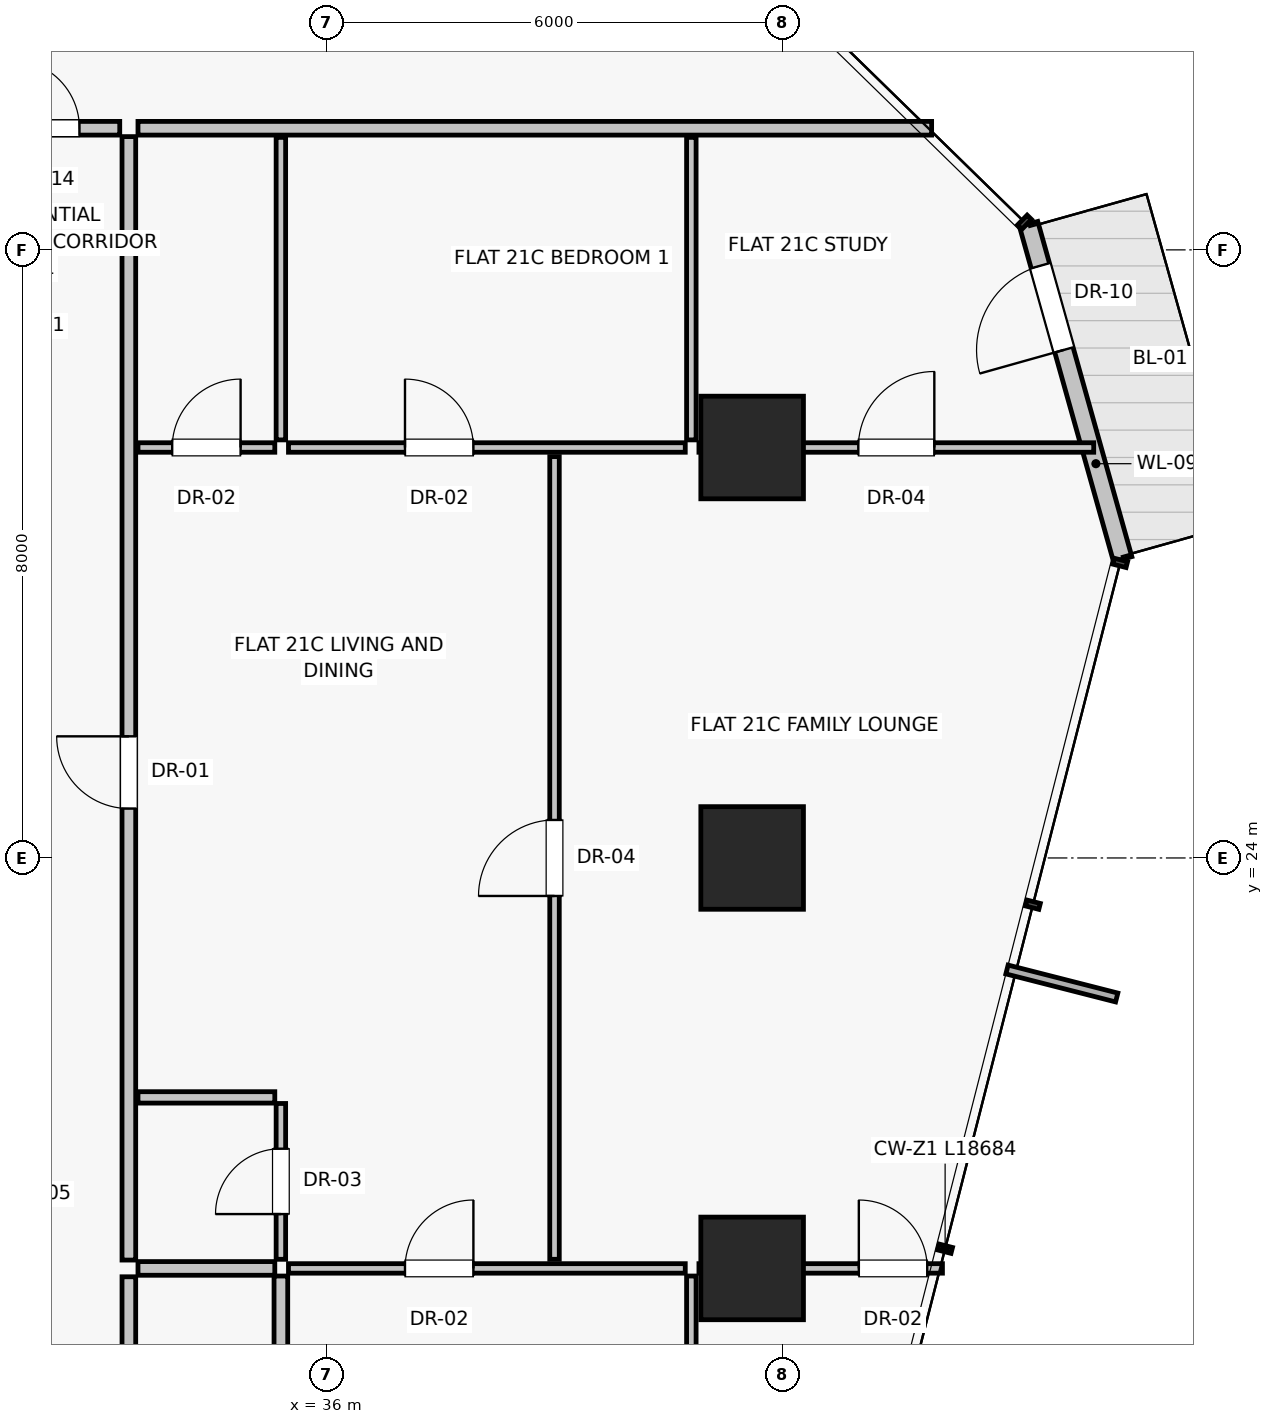
"""IFC4 building model, lengths in metres.
Left out: names, types, materials, properties, quantities, classifications, styles, units other than length and angle.
Written with IfcOpenShell. Run it as: python <this file> out.ifc"""

import sys

from ifc_helpers import new_model, si_unit, direction, frame, frame_2d, origin, origin_2d, place, context, subcontext, project, spatial, rectangle, extrude, source, transform, mapped, element, fill, save


model = new_model("IFC4")
c1 = context("Model", 3, precision=1e-05, world=origin(), true_north=direction((0.0, 1.0)))
c2 = subcontext(c1, "Body", "Model", "MODEL_VIEW")
j1 = project(units=[si_unit("LENGTHUNIT", "METRE"), si_unit("PLANEANGLEUNIT", "RADIAN")], contexts=[c1])
p1 = place(None, origin())
s1 = spatial("IfcSite", under=j1, at=p1, CompositionType="ELEMENT")
p2 = place(p1, origin())
s2 = spatial("IfcBuilding", under=s1, at=p2, CompositionType="ELEMENT")
p3 = place(p2, frame((0.0, 0.0, 77.1)))
s3 = spatial("IfcBuildingStorey", under=s2, at=p3, CompositionType="ELEMENT", Elevation=77.1)
for number, where, z_axis, x_axis in (
    (1, (41.6, 18.6, 0.0), (0.0, 0.0, 1.0), (1.0, 0.0, 0.0)),
    (2, (41.6, 24.0, 0.0), (0.0, 0.0, 1.0), (1.0, 0.0, 0.0)),
    (3, (41.6, 29.4, 0.0), (0.0, 0.0, 1.0), (1.0, 0.0, 0.0)),
):
    element("IfcColumn", number, at=place(p3, frame(where, z_axis=z_axis, x_axis=x_axis)), inside=s3, PredefinedType="COLUMN", context=c2, shape_type="SweptSolid", body=[
        extrude(rectangle(XDim=1.35, YDim=1.35, at=origin_2d()), origin(), (0.0, 0.0, 1.0), 3.25),
    ])
p4 = place(p3, frame((46.475, 27.93, 0.0), z_axis=(0.0, 0.0, 1.0), x_axis=(-0.270254656395, 0.962788876492, 0.0)))
e4 = element("IfcWall", 4, at=p4, inside=s3, PredefinedType="SOLIDWALL", context=c2, shape_type="SweptSolid", body=[
    extrude(rectangle(XDim=4.58, YDim=0.25, at=frame_2d((2.29, 0.0))), origin(), (0.0, 0.0, 1.0), 2.93),
])
p5 = place(p4, frame((2.86, 0.0, 0.0)))
e5 = element("IfcOpeningElement", 5, at=p5, cuts=e4, PredefinedType="OPENING", context=c2, shape_type="SweptSolid", body=[
    extrude(rectangle(XDim=1.15, YDim=2.25, at=frame_2d((0.575, 1.125))), frame((0.0, 0.135, 0.0), z_axis=(0.0, -1.0, 0.0), x_axis=(1.0, 0.0, 0.0)), (0.0, 0.0, 1.0), 0.27),
])
p6 = place(p3, frame((33.52, 33.6, 0.0), z_axis=(0.0, 0.0, 1.0), x_axis=(1.0, 0.0, 0.0)))
e6 = element("IfcWall", 6, at=p6, inside=s3, PredefinedType="PARTITIONING", context=c2, shape_type="SweptSolid", body=[
    extrude(rectangle(XDim=10.441, YDim=0.18, at=frame_2d((5.221, 0.0))), origin(), (0.0, 0.0, 1.0), 2.93),
])
p7 = place(p3, frame((33.4, 14.31, 0.0), z_axis=(0.0, 0.0, 1.0), x_axis=(0.0, 1.0, 0.0)))
e7 = element("IfcWall", 7, at=p7, inside=s3, PredefinedType="PARTITIONING", context=c2, shape_type="SweptSolid", body=[
    extrude(rectangle(XDim=4.18, YDim=0.18, at=frame_2d((2.09, 0.0))), origin(), (0.0, 0.0, 1.0), 2.93),
])
p8 = place(p7, frame((1.59, 0.0, 0.0)))
e8 = element("IfcOpeningElement", 8, at=p8, cuts=e7, PredefinedType="OPENING", context=c2, shape_type="SweptSolid", body=[
    extrude(rectangle(XDim=1.0, YDim=2.01, at=frame_2d((0.5, 1.005))), frame((0.0, 0.1, 0.0), z_axis=(0.0, -1.0, 0.0), x_axis=(1.0, 0.0, 0.0)), (0.0, 0.0, 1.0), 0.2),
])
p9 = place(p3, frame((33.4, 18.71, 0.0), z_axis=(0.0, 0.0, 1.0), x_axis=(0.0, 1.0, 0.0)))
e9 = element("IfcWall", 9, at=p9, inside=s3, PredefinedType="PARTITIONING", context=c2, shape_type="SweptSolid", body=[
    extrude(rectangle(XDim=14.78, YDim=0.18, at=frame_2d((7.39, 0.0))), origin(), (0.0, 0.0, 1.0), 2.93),
])
p10 = place(p9, frame((5.94, 0.0, 0.0)))
e10 = element("IfcOpeningElement", 10, at=p10, cuts=e9, PredefinedType="OPENING", context=c2, shape_type="SweptSolid", body=[
    extrude(rectangle(XDim=0.95, YDim=2.02, at=frame_2d((0.475, 1.01))), frame((0.0, 0.1, 0.0), z_axis=(0.0, -1.0, 0.0), x_axis=(1.0, 0.0, 0.0)), (0.0, 0.0, 1.0), 0.2),
])
p11 = place(p3, frame((40.8, 14.32, 0.0), z_axis=(0.0, 0.0, 1.0), x_axis=(0.0, 1.0, 0.0)))
e11 = element("IfcWall", 11, at=p11, inside=s3, PredefinedType="PARTITIONING", context=c2, shape_type="SweptSolid", body=[
    extrude(rectangle(XDim=4.18, YDim=0.125, at=frame_2d((2.09, 0.0))), origin(), (0.0, 0.0, 1.0), 2.93),
])
p12 = place(p3, frame((40.9, 18.6, 0.0), z_axis=(0.0, 0.0, 1.0), x_axis=(1.0, 0.0, 0.0)))
e12 = element("IfcWall", 12, at=p12, inside=s3, PredefinedType="PARTITIONING", context=c2, shape_type="SweptSolid", body=[
    extrude(rectangle(XDim=3.204, YDim=0.125, at=frame_2d((1.602, 0.0))), origin(), (0.0, 0.0, 1.0), 2.229),
])
p13 = place(p12, frame((2.104, 0.0, 0.0)))
e13 = element("IfcOpeningElement", 13, at=p13, cuts=e12, PredefinedType="OPENING", context=c2, shape_type="SweptSolid", body=[
    extrude(rectangle(XDim=0.9, YDim=2.01, at=frame_2d((0.45, 1.005))), frame((0.0, 0.073, 0.0), z_axis=(0.0, -1.0, 0.0), x_axis=(1.0, 0.0, 0.0)), (0.0, 0.0, 1.0), 0.145),
])
p14 = place(p3, frame((40.8, 29.5, 0.0), z_axis=(0.0, 0.0, 1.0), x_axis=(0.0, 1.0, 0.0)))
e14 = element("IfcWall", 14, at=p14, inside=s3, PredefinedType="PARTITIONING", context=c2, shape_type="SweptSolid", body=[
    extrude(rectangle(XDim=3.98, YDim=0.125, at=frame_2d((1.99, 0.0))), origin(), (0.0, 0.0, 1.0), 2.93),
])
p15 = place(p3, frame((40.9, 29.4, 0.0), z_axis=(0.0, 0.0, 1.0), x_axis=(1.0, 0.0, 0.0)))
e15 = element("IfcWall", 15, at=p15, inside=s3, PredefinedType="PARTITIONING", context=c2, shape_type="SweptSolid", body=[
    extrude(rectangle(XDim=5.194, YDim=0.125, at=frame_2d((2.597, 0.0))), origin(), (0.0, 0.0, 1.0), 2.229),
])
p16 = place(p15, frame((2.097, 0.0, 0.0)))
e16 = element("IfcOpeningElement", 16, at=p16, cuts=e15, PredefinedType="OPENING", context=c2, shape_type="SweptSolid", body=[
    extrude(rectangle(XDim=1.0, YDim=2.01, at=frame_2d((0.5, 1.005))), frame((0.0, 0.073, 0.0), z_axis=(0.0, -1.0, 0.0), x_axis=(1.0, 0.0, 0.0)), (0.0, 0.0, 1.0), 0.145),
])
p17 = place(p3, frame((39.0, 18.72, 0.0), z_axis=(0.0, 0.0, 1.0), x_axis=(0.0, 1.0, 0.0)))
e17 = element("IfcWall", 17, at=p17, inside=s3, PredefinedType="PARTITIONING", context=c2, shape_type="SweptSolid", body=[
    extrude(rectangle(XDim=10.56, YDim=0.125, at=frame_2d((5.28, 0.0))), origin(), (0.0, 0.0, 1.0), 2.93),
])
p18 = place(p17, frame((4.78, 0.0, 0.0)))
e18 = element("IfcOpeningElement", 18, at=p18, cuts=e17, PredefinedType="OPENING", context=c2, shape_type="SweptSolid", body=[
    extrude(rectangle(XDim=1.0, YDim=2.01, at=frame_2d((0.5, 1.005))), frame((0.0, 0.073, 0.0), z_axis=(0.0, -1.0, 0.0), x_axis=(1.0, 0.0, 0.0)), (0.0, 0.0, 1.0), 0.145),
])
p19 = place(p3, frame((35.4, 14.32, 0.0), z_axis=(0.0, 0.0, 1.0), x_axis=(0.0, 1.0, 0.0)))
e19 = element("IfcWall", 19, at=p19, inside=s3, PredefinedType="PARTITIONING", context=c2, shape_type="SweptSolid", body=[
    extrude(rectangle(XDim=4.18, YDim=0.18, at=frame_2d((2.09, 0.0))), origin(), (0.0, 0.0, 1.0), 2.93),
])
p20 = place(p3, frame((33.52, 18.6, 0.0), z_axis=(0.0, 0.0, 1.0), x_axis=(1.0, 0.0, 0.0)))
e20 = element("IfcWall", 20, at=p20, inside=s3, PredefinedType="PARTITIONING", context=c2, shape_type="SweptSolid", body=[
    extrude(rectangle(XDim=1.8, YDim=0.18, at=frame_2d((0.9, 0.0))), origin(), (0.0, 0.0, 1.0), 2.93),
])
p21 = place(p3, frame((35.5, 18.6, 0.0), z_axis=(0.0, 0.0, 1.0), x_axis=(1.0, 0.0, 0.0)))
e21 = element("IfcWall", 21, at=p21, inside=s3, PredefinedType="PARTITIONING", context=c2, shape_type="SweptSolid", body=[
    extrude(rectangle(XDim=5.22, YDim=0.125, at=frame_2d((2.61, 0.0))), origin(), (0.0, 0.0, 1.0), 2.229),
])
p22 = place(p21, frame((1.533, 0.0, 0.0)))
e22 = element("IfcOpeningElement", 22, at=p22, cuts=e21, PredefinedType="OPENING", context=c2, shape_type="SweptSolid", body=[
    extrude(rectangle(XDim=0.9, YDim=2.01, at=frame_2d((0.45, 1.005))), frame((0.0, 0.073, 0.0), z_axis=(0.0, -1.0, 0.0), x_axis=(1.0, 0.0, 0.0)), (0.0, 0.0, 1.0), 0.145),
])
p23 = place(p3, frame((33.52, 20.85, 0.0), z_axis=(0.0, 0.0, 1.0), x_axis=(1.0, 0.0, 0.0)))
e23 = element("IfcWall", 23, at=p23, inside=s3, PredefinedType="PARTITIONING", context=c2, shape_type="SweptSolid", body=[
    extrude(rectangle(XDim=1.8, YDim=0.15, at=frame_2d((0.9, 0.0))), origin(), (0.0, 0.0, 1.0), 2.93),
])
p24 = place(p3, frame((35.4, 18.72, 0.0), z_axis=(0.0, 0.0, 1.0), x_axis=(0.0, 1.0, 0.0)))
e24 = element("IfcWall", 24, at=p24, inside=s3, PredefinedType="PARTITIONING", context=c2, shape_type="SweptSolid", body=[
    extrude(rectangle(XDim=2.05, YDim=0.125, at=frame_2d((1.025, 0.0))), origin(), (0.0, 0.0, 1.0), 2.93),
])
p25 = place(p24, frame((0.595, 0.0, 0.0)))
e25 = element("IfcOpeningElement", 25, at=p25, cuts=e24, PredefinedType="OPENING", context=c2, shape_type="SweptSolid", body=[
    extrude(rectangle(XDim=0.86, YDim=2.01, at=frame_2d((0.43, 1.005))), frame((0.0, 0.073, 0.0), z_axis=(0.0, -1.0, 0.0), x_axis=(1.0, 0.0, 0.0)), (0.0, 0.0, 1.0), 0.145),
])
p26 = place(p3, frame((33.52, 29.4, 0.0), z_axis=(0.0, 0.0, 1.0), x_axis=(1.0, 0.0, 0.0)))
e26 = element("IfcWall", 26, at=p26, inside=s3, PredefinedType="PARTITIONING", context=c2, shape_type="SweptSolid", body=[
    extrude(rectangle(XDim=1.8, YDim=0.125, at=frame_2d((0.9, 0.0))), origin(), (0.0, 0.0, 1.0), 2.93),
])
p27 = place(p26, frame((0.45, 0.0, 0.0)))
e27 = element("IfcOpeningElement", 27, at=p27, cuts=e26, PredefinedType="OPENING", context=c2, shape_type="SweptSolid", body=[
    extrude(rectangle(XDim=0.9, YDim=2.01, at=frame_2d((0.45, 1.005))), frame((0.0, 0.073, 0.0), z_axis=(0.0, -1.0, 0.0), x_axis=(1.0, 0.0, 0.0)), (0.0, 0.0, 1.0), 0.145),
])
p28 = place(p3, frame((35.4, 29.5, 0.0), z_axis=(0.0, 0.0, 1.0), x_axis=(0.0, 1.0, 0.0)))
e28 = element("IfcWall", 28, at=p28, inside=s3, PredefinedType="PARTITIONING", context=c2, shape_type="SweptSolid", body=[
    extrude(rectangle(XDim=3.98, YDim=0.125, at=frame_2d((1.99, 0.0))), origin(), (0.0, 0.0, 1.0), 2.93),
])
p29 = place(p3, frame((35.5, 29.4, 0.0), z_axis=(0.0, 0.0, 1.0), x_axis=(1.0, 0.0, 0.0)))
e29 = element("IfcWall", 29, at=p29, inside=s3, PredefinedType="PARTITIONING", context=c2, shape_type="SweptSolid", body=[
    extrude(rectangle(XDim=5.22, YDim=0.125, at=frame_2d((2.61, 0.0))), origin(), (0.0, 0.0, 1.0), 2.229),
])
p30 = place(p29, frame((1.533, 0.0, 0.0)))
e30 = element("IfcOpeningElement", 30, at=p30, cuts=e29, PredefinedType="OPENING", context=c2, shape_type="SweptSolid", body=[
    extrude(rectangle(XDim=0.9, YDim=2.01, at=frame_2d((0.45, 1.005))), frame((0.0, 0.073, 0.0), z_axis=(0.0, -1.0, 0.0), x_axis=(1.0, 0.0, 0.0)), (0.0, 0.0, 1.0), 0.145),
])
p31 = place(p3, frame((31.32, 33.6, 0.0), z_axis=(0.0, 0.0, 1.0), x_axis=(1.0, 0.0, 0.0)))
e31 = element("IfcWall", 31, at=p31, inside=s3, PredefinedType="PARTITIONING", context=c2, shape_type="SweptSolid", body=[
    extrude(rectangle(XDim=1.96, YDim=0.18, at=frame_2d((0.98, 0.0))), origin(), (0.0, 0.0, 1.0), 2.93),
])
p32 = place(p31, frame((0.53, 0.0, 0.0)))
e32 = element("IfcOpeningElement", 32, at=p32, cuts=e31, PredefinedType="OPENING", context=c2, shape_type="SweptSolid", body=[
    extrude(rectangle(XDim=0.9, YDim=2.01, at=frame_2d((0.45, 1.005))), frame((0.0, 0.1, 0.0), z_axis=(0.0, -1.0, 0.0), x_axis=(1.0, 0.0, 0.0)), (0.0, 0.0, 1.0), 0.2),
])
m1 = source(origin(), c2, "Body", "SweptSolid", [
    extrude(rectangle(XDim=1.15, YDim=2.25, at=frame_2d((0.575, 1.125))), frame((0.0, 0.025, 0.0), z_axis=(0.0, -1.0, 0.0), x_axis=(1.0, 0.0, 0.0)), (0.0, 0.0, 1.0), 0.05),
])
p33 = place(p5, frame((1.15, 0.0, 0.0), z_axis=(0.0, 0.0, 1.0), x_axis=(-1.0, 0.0, 0.0)))
e33 = element("IfcDoor", 33, at=p33, inside=s3, OperationType="SINGLE_SWING_LEFT", PredefinedType="DOOR", context=c2, shape_type="MappedRepresentation", body=[
    mapped(m1, transform((0.0, 0.0, 0.0), scale=1.0)),
])
fill(e5, e33)
m2 = source(origin(), c2, "Body", "SweptSolid", [
    extrude(rectangle(XDim=0.95, YDim=2.02, at=frame_2d((0.475, 1.01))), frame((0.0, 0.025, 0.0), z_axis=(0.0, -1.0, 0.0), x_axis=(1.0, 0.0, 0.0)), (0.0, 0.0, 1.0), 0.05),
])
p34 = place(p10, origin())
e34 = element("IfcDoor", 34, at=p34, inside=s3, OperationType="SINGLE_SWING_RIGHT", PredefinedType="DOOR", context=c2, shape_type="MappedRepresentation", body=[
    mapped(m2, transform((0.0, 0.0, 0.0), scale=1.0)),
])
fill(e10, e34)
m3 = source(origin(), c2, "Body", "SweptSolid", [
    extrude(rectangle(XDim=0.9, YDim=2.01, at=frame_2d((0.45, 1.005))), frame((0.0, 0.025, 0.0), z_axis=(0.0, -1.0, 0.0), x_axis=(1.0, 0.0, 0.0)), (0.0, 0.0, 1.0), 0.05),
])
p35 = place(p13, origin())
e35 = element("IfcDoor", 35, at=p35, inside=s3, OperationType="SINGLE_SWING_LEFT", PredefinedType="DOOR", context=c2, shape_type="MappedRepresentation", body=[
    mapped(m3, transform((0.0, 0.0, 0.0), scale=1.0)),
])
fill(e13, e35)
m4 = source(origin(), c2, "Body", "SweptSolid", [
    extrude(rectangle(XDim=1.0, YDim=2.01, at=frame_2d((0.5, 1.005))), frame((0.0, 0.025, 0.0), z_axis=(0.0, -1.0, 0.0), x_axis=(1.0, 0.0, 0.0)), (0.0, 0.0, 1.0), 0.05),
])
p36 = place(p16, origin())
e36 = element("IfcDoor", 36, at=p36, inside=s3, OperationType="SINGLE_SWING_RIGHT", PredefinedType="DOOR", context=c2, shape_type="MappedRepresentation", body=[
    mapped(m4, transform((0.0, 0.0, 0.0), scale=1.0)),
])
fill(e16, e36)
p37 = place(p18, origin())
e37 = element("IfcDoor", 37, at=p37, inside=s3, OperationType="SINGLE_SWING_LEFT", PredefinedType="DOOR", context=c2, shape_type="MappedRepresentation", body=[
    mapped(m4, transform((0.0, 0.0, 0.0), scale=1.0)),
])
fill(e18, e37)
p38 = place(p22, origin())
e38 = element("IfcDoor", 38, at=p38, inside=s3, OperationType="SINGLE_SWING_RIGHT", PredefinedType="DOOR", context=c2, shape_type="MappedRepresentation", body=[
    mapped(m3, transform((0.0, 0.0, 0.0), scale=1.0)),
])
fill(e22, e38)
m5 = source(origin(), c2, "Body", "SweptSolid", [
    extrude(rectangle(XDim=0.86, YDim=2.01, at=frame_2d((0.43, 1.005))), frame((0.0, 0.025, 0.0), z_axis=(0.0, -1.0, 0.0), x_axis=(1.0, 0.0, 0.0)), (0.0, 0.0, 1.0), 0.05),
])
p39 = place(p25, origin())
e39 = element("IfcDoor", 39, at=p39, inside=s3, OperationType="SINGLE_SWING_LEFT", PredefinedType="DOOR", context=c2, shape_type="MappedRepresentation", body=[
    mapped(m5, transform((0.0, 0.0, 0.0), scale=1.0)),
])
fill(e25, e39)
p40 = place(p27, origin())
e40 = element("IfcDoor", 40, at=p40, inside=s3, OperationType="SINGLE_SWING_RIGHT", PredefinedType="DOOR", context=c2, shape_type="MappedRepresentation", body=[
    mapped(m3, transform((0.0, 0.0, 0.0), scale=1.0)),
])
fill(e27, e40)
p41 = place(p30, origin())
e41 = element("IfcDoor", 41, at=p41, inside=s3, OperationType="SINGLE_SWING_LEFT", PredefinedType="DOOR", context=c2, shape_type="MappedRepresentation", body=[
    mapped(m3, transform((0.0, 0.0, 0.0), scale=1.0)),
])
fill(e30, e41)
p42 = place(p32, origin())
e42 = element("IfcDoor", 42, at=p42, inside=s3, OperationType="SINGLE_SWING_LEFT", PredefinedType="DOOR", context=c2, shape_type="MappedRepresentation", body=[
    mapped(m3, transform((0.0, 0.0, 0.0), scale=1.0)),
])
fill(e32, e42)
save(model, sys.argv[1])
